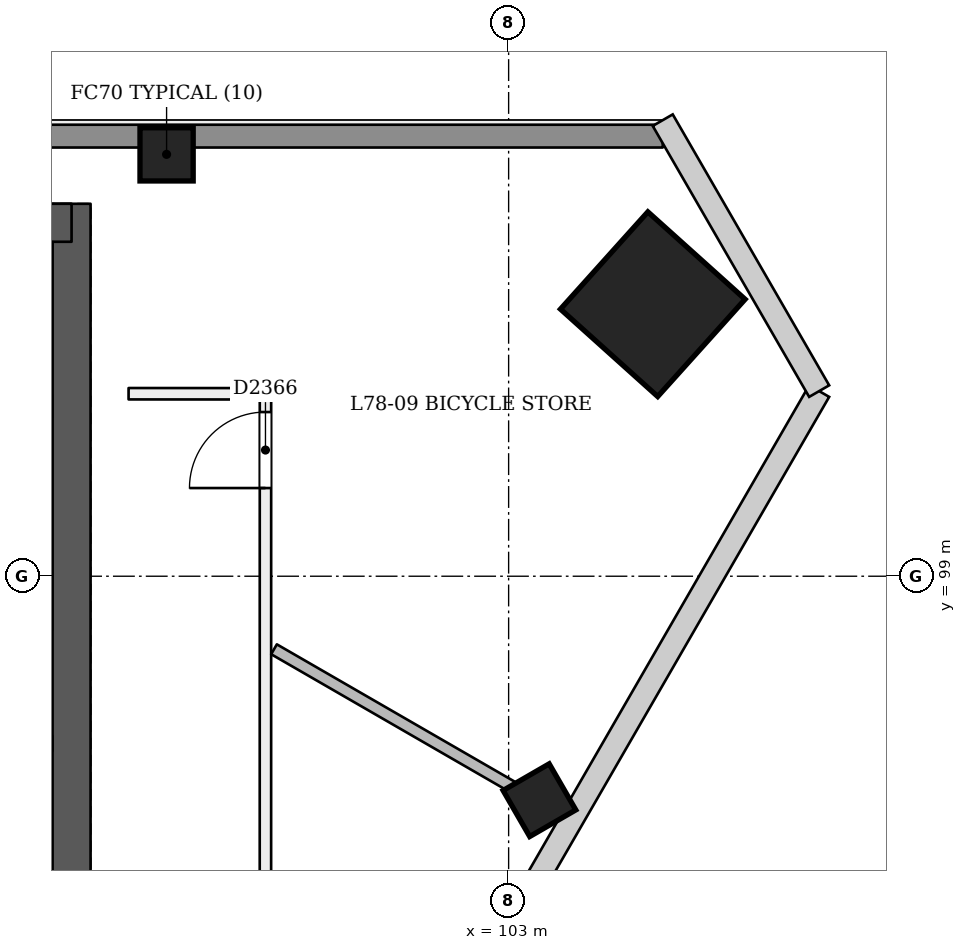
"""IFC4 building model, lengths in metres.
Left out: names, types, materials, properties, quantities, classifications, styles, units other than length and angle.
Written with IfcOpenShell. Run it as: python <this file> out.ifc"""

import sys

from ifc_helpers import new_model, si_unit, direction, frame, frame_2d, origin, origin_2d, place, context, subcontext, project, spatial, rectangle, extrude, element, fill, save


model = new_model("IFC4")
c1 = context("Model", 3, precision=1e-05, world=origin(), true_north=direction((0.0, 1.0)))
c2 = subcontext(c1, "Body", "Model", "MODEL_VIEW")
j1 = project(units=[si_unit("LENGTHUNIT", "METRE"), si_unit("PLANEANGLEUNIT", "RADIAN")], contexts=[c1])
p1 = place(None, origin())
s1 = spatial("IfcSite", under=j1, at=p1, CompositionType="ELEMENT")
p2 = place(p1, origin())
s2 = spatial("IfcBuilding", under=s1, at=p2, CompositionType="ELEMENT")
p3 = place(p2, frame((0.0, 0.0, 302.2)))
s3 = spatial("IfcBuildingStorey", under=s2, at=p3, CompositionType="ELEMENT", Elevation=302.2)
p4 = place(p3, frame((97.25, 93.15, 0.0), z_axis=(0.0, 0.0, 1.0), x_axis=(0.0, 1.0, 0.0)))
e1 = element("IfcWall", 1, at=p4, inside=s3, PredefinedType="SHEAR", context=c2, shape_type="SweptSolid", body=[
    extrude(rectangle(XDim=10.75, YDim=0.5, at=frame_2d((5.375, 0.0))), origin(), (0.0, 0.0, 1.0), 3.6),
])
p5 = place(p3, frame((97.25, 103.65, 0.0), z_axis=(0.0, 0.0, 1.0), x_axis=(-1.0, 0.0, 0.0)))
e2 = element("IfcWall", 2, at=p5, inside=s3, PredefinedType="SHEAR", context=c2, shape_type="SweptSolid", body=[
    extrude(rectangle(XDim=24.75, YDim=0.5, at=frame_2d((12.375, 0.0))), origin(), (0.0, 0.0, 1.0), 3.6),
])
p6 = place(p3, frame((104.931, 102.568, 0.0), z_axis=(-0.028401796786, 0.009286506348, 0.999553449666), x_axis=(0.498888802721, -0.866380987586, 0.022224915478)))
e3 = element("IfcColumn", 3, at=p6, inside=s3, PredefinedType="COLUMN", context=c2, shape_type="SweptSolid", body=[
    extrude(rectangle(XDim=1.72, YDim=1.72, at=origin_2d()), origin(), (0.0, 0.0, 1.0), 3.602),
])
p7 = place(p3, frame((98.5, 104.55, 0.0), z_axis=(0.0, 0.0, 1.0), x_axis=(1.0, 0.0, 0.0)))
e4 = element("IfcColumn", 4, at=p7, inside=s3, PredefinedType="COLUMN", context=c2, shape_type="SweptSolid", body=[
    extrude(rectangle(XDim=0.7, YDim=0.7, at=origin_2d()), origin(), (0.0, 0.0, 1.0), 3.6),
])
p8 = place(p3, frame((103.433, 96.007, -0.021), z_axis=(-0.02222134892, 0.038480872521, 0.999012229206), x_axis=(-0.500169924484, -0.865642189293, 0.022218162776)))
e5 = element("IfcColumn", 5, at=p8, inside=s3, PredefinedType="COLUMN", context=c2, shape_type="SweptSolid", body=[
    extrude(rectangle(XDim=0.7, YDim=0.7, at=origin_2d()), origin(), (0.0, 0.0, 1.0), 3.604),
])
p9 = place(p3, frame((99.8, 90.7, 0.0), z_axis=(0.0, 0.0, 1.0), x_axis=(9.1267939e-05, 0.999999995835, 0.0)))
e6 = element("IfcWall", 6, at=p9, inside=s3, PredefinedType="PARTITIONING", context=c2, shape_type="SweptSolid", body=[
    extrude(rectangle(XDim=10.7, YDim=0.15, at=frame_2d((5.35, 0.0))), origin(), (0.0, 0.0, 1.0), 3.2),
])
p10 = place(p9, frame((9.46, 0.0, 0.0)))
e7 = element("IfcOpeningElement", 7, at=p10, cuts=e6, PredefinedType="OPENING", context=c2, shape_type="SweptSolid", body=[
    extrude(rectangle(XDim=1.0, YDim=2.1, at=frame_2d((0.5, 1.05))), frame((0.0, 0.085, 0.0), z_axis=(0.0, -1.0, 0.0), x_axis=(1.0, 0.0, 0.0)), (0.0, 0.0, 1.0), 0.171),
])
p11 = place(p3, frame((99.726, 101.4, 0.0), z_axis=(0.0, 0.0, 1.0), x_axis=(-0.999999909973, 0.000424328109, 0.0)))
e8 = element("IfcWall", 8, at=p11, inside=s3, PredefinedType="PARTITIONING", context=c2, shape_type="SweptSolid", body=[
    extrude(rectangle(XDim=1.726, YDim=0.15, at=frame_2d((0.863, 0.0))), origin(), (0.0, 0.0, 1.0), 3.2),
])
p12 = place(p3, frame((103.735, 95.833, 0.0), z_axis=(0.0, 0.0, 1.0), x_axis=(-0.86603542762, 0.499982637805, 0.0)))
e9 = element("IfcWall", 9, at=p12, inside=s3, PredefinedType="PARTITIONING", context=c2, shape_type="SweptSolid", body=[
    extrude(rectangle(XDim=4.413, YDim=0.15, at=frame_2d((2.207, 0.0))), origin(), (0.0, 0.0, 1.0), 2.7),
])
p13 = place(p3, frame((64.972, 104.79, 0.0), z_axis=(0.0, 0.0, 1.0), x_axis=(1.0, 0.0, 0.0)))
e10 = element("IfcWall", 10, at=p13, inside=s3, PredefinedType="SOLIDWALL", context=c2, shape_type="SweptSolid", body=[
    extrude(rectangle(XDim=40.055, YDim=0.3, at=frame_2d((20.028, 0.0))), origin(), (0.0, 0.0, 1.0), 2.7),
])
p14 = place(p10, origin())
e11 = element("IfcDoor", 11, at=p14, inside=s3, OperationType="SINGLE_SWING_LEFT", PredefinedType="NOTDEFINED", context=c2, shape_type="SweptSolid", body=[
    extrude(rectangle(XDim=1.0, YDim=2.1, at=frame_2d((0.5, 1.05))), frame((0.0, 0.025, 0.0), z_axis=(0.0, -1.0, 0.0), x_axis=(1.0, 0.0, 0.0)), (0.0, 0.0, 1.0), 0.05),
])
fill(e7, e11)
save(model, sys.argv[1])
